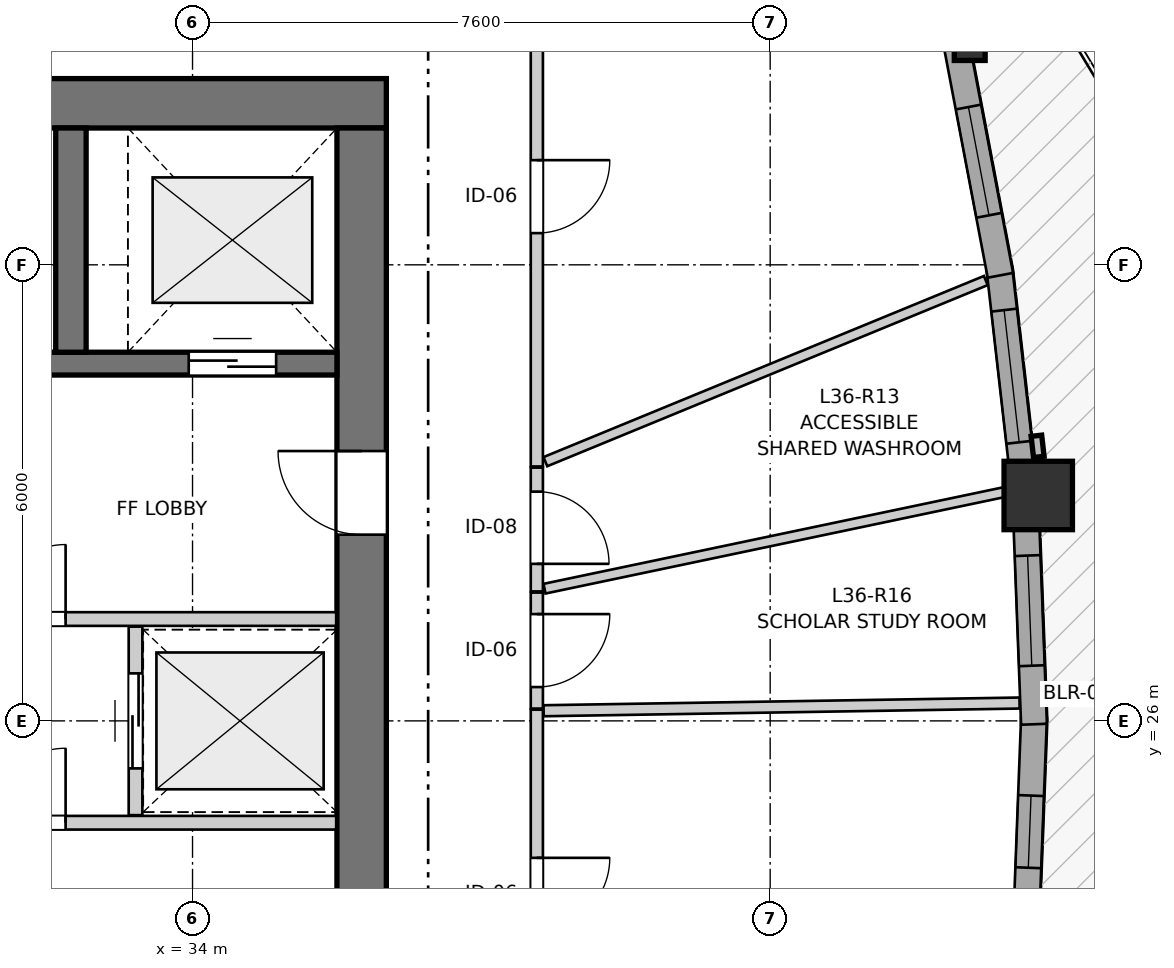
"""IFC4 building model, lengths in metres.
Left out: names, types, materials, properties, quantities, classifications, styles, units other than length and angle.
Written with IfcOpenShell. Run it as: python <this file> out.ifc"""

import sys

from ifc_helpers import new_model, si_unit, direction, frame, frame_2d, origin, origin_2d, place, context, subcontext, project, spatial, rectangle, i_section, extrude, source, transform, mapped, element, fill, save


model = new_model("IFC4")
c1 = context("Model", 3, precision=1e-05, world=origin(), true_north=direction((0.0, 1.0)))
c2 = subcontext(c1, "Body", "Model", "MODEL_VIEW")
j1 = project(units=[si_unit("LENGTHUNIT", "METRE"), si_unit("PLANEANGLEUNIT", "RADIAN")], contexts=[c1])
p1 = place(None, origin())
s1 = spatial("IfcSite", under=j1, at=p1, CompositionType="ELEMENT")
p2 = place(p1, origin())
s2 = spatial("IfcBuilding", under=s1, at=p2, CompositionType="ELEMENT")
p3 = place(p2, frame((0.0, 0.0, 121.6)))
s3 = spatial("IfcBuildingStorey", under=s2, at=p3, CompositionType="ELEMENT", Elevation=121.6)
p4 = place(p3, frame((36.55, 34.125, 0.0), z_axis=(0.0, 0.0, 1.0), x_axis=(-1.0, 0.0, 0.0)))
e1 = element("IfcWall", 1, at=p4, inside=s3, PredefinedType="SHEAR", context=c2, shape_type="SweptSolid", body=[
    extrude(rectangle(XDim=12.4, YDim=0.65, at=frame_2d((6.2, 0.0))), origin(), (0.0, 0.0, 1.0), 2.95),
])
p5 = place(p3, frame((36.225, 18.2, 0.0), z_axis=(0.0, 0.0, 1.0), x_axis=(0.0, 1.0, 0.0)))
e2 = element("IfcWall", 2, at=p5, inside=s3, PredefinedType="SHEAR", context=c2, shape_type="SweptSolid", body=[
    extrude(rectangle(XDim=15.6, YDim=0.65, at=frame_2d((7.8, 0.0))), origin(), (0.0, 0.0, 1.0), 2.95),
])
p6 = place(p5, frame((4.25, 0.0, 0.0)))
e3 = element("IfcOpeningElement", 3, at=p6, cuts=e2, PredefinedType="OPENING", context=c2, shape_type="SweptSolid", body=[
    extrude(rectangle(XDim=1.1, YDim=2.15, at=frame_2d((0.55, 1.075))), frame((0.0, 0.335, 0.0), z_axis=(0.0, -1.0, 0.0), x_axis=(1.0, 0.0, 0.0)), (0.0, 0.0, 1.0), 0.67),
])
p7 = place(p5, frame((10.25, 0.0, 0.0)))
e4 = element("IfcOpeningElement", 4, at=p7, cuts=e2, PredefinedType="OPENING", context=c2, shape_type="SweptSolid", body=[
    extrude(rectangle(XDim=1.1, YDim=2.15, at=frame_2d((0.55, 1.075))), frame((0.0, 0.335, 0.0), z_axis=(0.0, -1.0, 0.0), x_axis=(1.0, 0.0, 0.0)), (0.0, 0.0, 1.0), 0.67),
])
p8 = place(p3, frame((24.8, 30.7, 0.0), z_axis=(0.0, 0.0, 1.0), x_axis=(1.0, 0.0, 0.0)))
e5 = element("IfcWall", 5, at=p8, inside=s3, PredefinedType="SHEAR", context=c2, shape_type="SweptSolid", body=[
    extrude(rectangle(XDim=11.1, YDim=0.3, at=frame_2d((5.55, 0.0))), origin(), (0.0, 0.0, 1.0), 2.95),
])
p9 = place(p8, frame((6.22, 0.0, 0.0)))
e6 = element("IfcOpeningElement", 6, at=p9, cuts=e5, PredefinedType="OPENING", context=c2, shape_type="SweptSolid", body=[
    extrude(rectangle(XDim=0.98, YDim=2.15, at=frame_2d((0.49, 1.075))), frame((0.0, 0.16, 0.0), z_axis=(0.0, -1.0, 0.0), x_axis=(1.0, 0.0, 0.0)), (0.0, 0.0, 1.0), 0.32),
])
p10 = place(p8, frame((9.15, 0.0, 0.0)))
e7 = element("IfcOpeningElement", 7, at=p10, cuts=e5, PredefinedType="OPENING", context=c2, shape_type="SweptSolid", body=[
    extrude(rectangle(XDim=1.15, YDim=2.15, at=frame_2d((0.575, 1.075))), frame((0.0, 0.16, 0.0), z_axis=(0.0, -1.0, 0.0), x_axis=(1.0, 0.0, 0.0)), (0.0, 0.0, 1.0), 0.32),
])
p11 = place(p3, frame((32.4, 30.85, 0.0), z_axis=(0.0, 0.0, 1.0), x_axis=(0.0, 1.0, 0.0)))
e8 = element("IfcWall", 8, at=p11, inside=s3, PredefinedType="SHEAR", context=c2, shape_type="SweptSolid", body=[
    extrude(rectangle(XDim=2.95, YDim=0.4, at=frame_2d((1.475, 0.0))), origin(), (0.0, 0.0, 1.0), 2.95),
])
m1 = source(origin(), c2, "Body", "SweptSolid", [
    extrude(rectangle(XDim=0.9, YDim=0.9, at=origin_2d()), origin(), (0.0, 0.0, 1.0), 2.95),
])
p12 = place(p3, frame((45.127, 28.966, 0.0), z_axis=(0.0, 0.0, 1.0), x_axis=(1.0, 0.0, 0.0)))
e9 = element("IfcColumn", 9, at=p12, inside=s3, PredefinedType="COLUMN", context=c2, shape_type="MappedRepresentation", body=[
    mapped(m1, transform((0.0, 0.0, 0.0), x_axis=(1.0, 0.0, 0.0), y_axis=(0.0, 1.0, 0.0), z_axis=(0.0, 0.0, 1.0), scale=1.0)),
])
m2 = source(origin(), c2, "Body", "SweptSolid", [
    extrude(i_section(OverallWidth=0.406, OverallDepth=0.416, WebThickness=0.027, FlangeThickness=0.044, FilletRadius=0.015, at=origin_2d()), origin(), (0.0, 0.0, 1.0), 2.95),
])
p13 = place(p3, frame((44.226, 34.896, 0.0), z_axis=(0.0, 0.0, 1.0), x_axis=(1.0, 0.0, 0.0)))
e10 = element("IfcColumn", 10, at=p13, inside=s3, PredefinedType="PILASTER", context=c2, shape_type="MappedRepresentation", body=[
    mapped(m2, transform((0.0, 0.0, 0.0), x_axis=(1.0, 0.0, 0.0), y_axis=(0.0, 1.0, 0.0), z_axis=(0.0, 0.0, 1.0), scale=1.0)),
])
p14 = place(p3, frame((44.958, 23.061, 0.0), z_axis=(0.0, 0.0, 1.0), x_axis=(0.037940097137, 0.999280015326, 0.0)))
e11 = element("IfcWall", 11, at=p14, inside=s3, PredefinedType="SOLIDWALL", context=c2, shape_type="SweptSolid", body=[
    extrude(rectangle(XDim=2.986, YDim=0.34, at=frame_2d((1.493, 0.0))), origin(), (0.0, 0.0, 1.0), 2.48),
])
p15 = place(p14, frame((1.008, 0.0, 0.82)))
e12 = element("IfcOpeningElement", 12, at=p15, cuts=e11, PredefinedType="OPENING", context=c2, shape_type="SweptSolid", body=[
    extrude(rectangle(XDim=0.95, YDim=1.35, at=frame_2d((0.475, 0.675))), frame((0.0, 0.18, 0.0), z_axis=(0.0, -1.0, 0.0), x_axis=(1.0, 0.0, 0.0)), (0.0, 0.0, 1.0), 0.36),
])
p16 = place(p3, frame((45.071, 25.956, 0.0), z_axis=(0.0, 0.0, 1.0), x_axis=(-0.037997361734, 0.999277839493, 0.0)))
e13 = element("IfcWall", 13, at=p16, inside=s3, PredefinedType="SOLIDWALL", context=c2, shape_type="SweptSolid", body=[
    extrude(rectangle(XDim=2.776, YDim=0.34, at=frame_2d((1.388, 0.0))), origin(), (0.0, 0.0, 1.0), 2.48),
])
p17 = place(p16, frame((0.771, 0.0, 0.82)))
e14 = element("IfcOpeningElement", 14, at=p17, cuts=e13, PredefinedType="OPENING", context=c2, shape_type="SweptSolid", body=[
    extrude(rectangle(XDim=1.45, YDim=1.25, at=frame_2d((0.725, 0.625))), frame((0.0, 0.18, 0.0), z_axis=(0.0, -1.0, 0.0), x_axis=(1.0, 0.0, 0.0)), (0.0, 0.0, 1.0), 0.36),
])
p18 = place(p3, frame((44.932, 29.175, 0.0), z_axis=(0.0, 0.0, 1.0), x_axis=(-0.113290188042, 0.993561942354, 0.0)))
e15 = element("IfcWall", 15, at=p18, inside=s3, PredefinedType="SOLIDWALL", context=c2, shape_type="SweptSolid", body=[
    extrude(rectangle(XDim=2.793, YDim=0.34, at=frame_2d((1.396, 0.0))), origin(), (0.0, 0.0, 1.0), 2.48),
])
p19 = place(p18, frame((0.493, 0.0, 0.82)))
e16 = element("IfcOpeningElement", 16, at=p19, cuts=e15, PredefinedType="OPENING", context=c2, shape_type="SweptSolid", body=[
    extrude(rectangle(XDim=1.75, YDim=1.3, at=frame_2d((0.875, 0.65))), frame((0.0, 0.18, 0.0), z_axis=(0.0, -1.0, 0.0), x_axis=(1.0, 0.0, 0.0)), (0.0, 0.0, 1.0), 0.36),
])
p20 = place(p3, frame((44.629, 31.862, 0.0), z_axis=(0.0, 0.0, 1.0), x_axis=(-0.186690909565, 0.982418701108, 0.0)))
e17 = element("IfcWall", 17, at=p20, inside=s3, PredefinedType="SOLIDWALL", context=c2, shape_type="SweptSolid", body=[
    extrude(rectangle(XDim=3.037, YDim=0.34, at=frame_2d((1.518, 0.0))), origin(), (0.0, 0.0, 1.0), 2.48),
])
p21 = place(p20, frame((0.803, 0.0, 0.82)))
e18 = element("IfcOpeningElement", 18, at=p21, cuts=e17, PredefinedType="OPENING", context=c2, shape_type="SweptSolid", body=[
    extrude(rectangle(XDim=1.45, YDim=1.25, at=frame_2d((0.725, 0.625))), frame((0.0, 0.18, 0.0), z_axis=(0.0, -1.0, 0.0), x_axis=(1.0, 0.0, 0.0)), (0.0, 0.0, 1.0), 0.36),
])
p22 = place(p3, frame((30.67, 24.66, 0.0), z_axis=(0.0, 0.0, 1.0), x_axis=(1.0, 0.0, 0.0)))
e19 = element("IfcWall", 19, at=p22, inside=s3, PredefinedType="PARTITIONING", context=c2, shape_type="SweptSolid", body=[
    extrude(rectangle(XDim=5.22, YDim=0.18, at=frame_2d((2.61, 0.0))), origin(), (0.0, 0.0, 1.0), 2.95),
])
p23 = place(p22, frame((0.68, 0.0, 0.0)))
e20 = element("IfcOpeningElement", 20, at=p23, cuts=e19, PredefinedType="OPENING", context=c2, shape_type="SweptSolid", body=[
    extrude(rectangle(XDim=0.98, YDim=2.15, at=frame_2d((0.49, 1.075))), frame((0.0, 0.1, 0.0), z_axis=(0.0, -1.0, 0.0), x_axis=(1.0, 0.0, 0.0)), (0.0, 0.0, 1.0), 0.2),
])
p24 = place(p3, frame((30.67, 27.34, 0.0), z_axis=(0.0, 0.0, 1.0), x_axis=(1.0, 0.0, 0.0)))
e21 = element("IfcWall", 21, at=p24, inside=s3, PredefinedType="PARTITIONING", context=c2, shape_type="SweptSolid", body=[
    extrude(rectangle(XDim=5.22, YDim=0.18, at=frame_2d((2.61, 0.0))), origin(), (0.0, 0.0, 1.0), 2.95),
])
p25 = place(p24, frame((0.68, 0.0, 0.0)))
e22 = element("IfcOpeningElement", 22, at=p25, cuts=e21, PredefinedType="OPENING", context=c2, shape_type="SweptSolid", body=[
    extrude(rectangle(XDim=0.98, YDim=2.15, at=frame_2d((0.49, 1.075))), frame((0.0, 0.1, 0.0), z_axis=(0.0, -1.0, 0.0), x_axis=(1.0, 0.0, 0.0)), (0.0, 0.0, 1.0), 0.2),
])
p26 = place(p3, frame((33.25, 24.76, 0.0), z_axis=(0.0, 0.0, 1.0), x_axis=(0.0, 1.0, 0.0)))
e23 = element("IfcWall", 23, at=p26, inside=s3, PredefinedType="PARTITIONING", context=c2, shape_type="SweptSolid", body=[
    extrude(rectangle(XDim=2.48, YDim=0.18, at=frame_2d((1.24, 0.0))), origin(), (0.0, 0.0, 1.0), 2.95),
])
p27 = place(p26, frame((0.615, 0.0, 0.0)))
e24 = element("IfcOpeningElement", 24, at=p27, cuts=e23, PredefinedType="OPENING", context=c2, shape_type="SweptSolid", body=[
    extrude(rectangle(XDim=1.25, YDim=2.15, at=frame_2d((0.625, 1.075))), frame((0.0, 0.1, 0.0), z_axis=(0.0, -1.0, 0.0), x_axis=(1.0, 0.0, 0.0)), (0.0, 0.0, 1.0), 0.2),
])
p28 = place(p3, frame((38.53, 36.43, 0.0), z_axis=(0.0, 0.0, 1.0), x_axis=(0.0, -1.0, 0.0)))
e25 = element("IfcWall", 25, at=p28, inside=s3, PredefinedType="PARTITIONING", context=c2, shape_type="SweptSolid", body=[
    extrude(rectangle(XDim=7.083, YDim=0.16, at=frame_2d((3.542, 0.0))), origin(), (0.0, 0.0, 1.0), 2.588),
])
p29 = place(p28, frame((3.053, 0.0, 0.0)))
e26 = element("IfcOpeningElement", 26, at=p29, cuts=e25, PredefinedType="OPENING", context=c2, shape_type="SweptSolid", body=[
    extrude(rectangle(XDim=0.96, YDim=2.1, at=frame_2d((0.48, 1.05))), frame((0.0, 0.09, 0.0), z_axis=(0.0, -1.0, 0.0), x_axis=(1.0, 0.0, 0.0)), (0.0, 0.0, 1.0), 0.18),
])
p30 = place(p3, frame((38.53, 26.147, 0.0), z_axis=(0.0, 0.0, 1.0), x_axis=(0.0, -1.0, 0.0)))
e27 = element("IfcWall", 27, at=p30, inside=s3, PredefinedType="PARTITIONING", context=c2, shape_type="SweptSolid", body=[
    extrude(rectangle(XDim=4.811, YDim=0.16, at=frame_2d((2.406, 0.0))), origin(), (0.0, 0.0, 1.0), 2.95),
])
p31 = place(p30, frame((1.949, 0.0, 0.0)))
e28 = element("IfcOpeningElement", 28, at=p31, cuts=e27, PredefinedType="OPENING", context=c2, shape_type="SweptSolid", body=[
    extrude(rectangle(XDim=0.96, YDim=2.1, at=frame_2d((0.48, 1.05))), frame((0.0, 0.09, 0.0), z_axis=(0.0, -1.0, 0.0), x_axis=(1.0, 0.0, 0.0)), (0.0, 0.0, 1.0), 0.18),
])
p32 = place(p3, frame((38.53, 29.332, 0.0), z_axis=(0.0, 0.0, 1.0), x_axis=(0.0, -1.0, 0.0)))
e29 = element("IfcWall", 29, at=p32, inside=s3, PredefinedType="PARTITIONING", context=c2, shape_type="SweptSolid", body=[
    extrude(rectangle(XDim=1.629, YDim=0.16, at=frame_2d((0.814, 0.0))), origin(), (0.0, 0.0, 1.0), 2.95),
])
p33 = place(p32, frame((0.316, 0.0, 0.0)))
e30 = element("IfcOpeningElement", 30, at=p33, cuts=e29, PredefinedType="OPENING", context=c2, shape_type="SweptSolid", body=[
    extrude(rectangle(XDim=0.95, YDim=2.1, at=frame_2d((0.475, 1.05))), frame((0.0, 0.09, 0.0), z_axis=(0.0, -1.0, 0.0), x_axis=(1.0, 0.0, 0.0)), (0.0, 0.0, 1.0), 0.18),
])
p34 = place(p3, frame((38.53, 27.688, 0.0), z_axis=(0.0, 0.0, 1.0), x_axis=(0.0, -1.0, 0.0)))
e31 = element("IfcWall", 31, at=p34, inside=s3, PredefinedType="PARTITIONING", context=c2, shape_type="SweptSolid", body=[
    extrude(rectangle(XDim=1.526, YDim=0.16, at=frame_2d((0.763, 0.0))), origin(), (0.0, 0.0, 1.0), 2.95),
])
p35 = place(p34, frame((0.283, 0.0, 0.0)))
e32 = element("IfcOpeningElement", 32, at=p35, cuts=e31, PredefinedType="OPENING", context=c2, shape_type="SweptSolid", body=[
    extrude(rectangle(XDim=0.96, YDim=2.1, at=frame_2d((0.48, 1.05))), frame((0.0, 0.09, 0.0), z_axis=(0.0, -1.0, 0.0), x_axis=(1.0, 0.0, 0.0)), (0.0, 0.0, 1.0), 0.18),
])
p36 = place(p3, frame((38.642, 29.41, 0.0), z_axis=(0.0, 0.0, 1.0), x_axis=(0.924865201518, 0.380295094659, 0.0)))
e33 = element("IfcWall", 33, at=p36, inside=s3, PredefinedType="PARTITIONING", context=c2, shape_type="SweptSolid", body=[
    extrude(rectangle(XDim=6.266, YDim=0.13, at=frame_2d((3.133, 0.0))), origin(), (0.0, 0.0, 1.0), 2.95),
])
p37 = place(p3, frame((38.631, 27.739, 0.0), z_axis=(0.0, 0.0, 1.0), x_axis=(0.978654667538, 0.205511658323, 0.0)))
e34 = element("IfcWall", 34, at=p37, inside=s3, PredefinedType="PARTITIONING", context=c2, shape_type="SweptSolid", body=[
    extrude(rectangle(XDim=6.29, YDim=0.13, at=frame_2d((3.145, 0.0))), origin(), (0.0, 0.0, 1.0), 2.368),
])
p38 = place(p3, frame((38.619, 26.133, 0.0), z_axis=(0.0, 0.0, 1.0), x_axis=(0.999869130012, 0.016177850558, 0.0)))
e35 = element("IfcWall", 35, at=p38, inside=s3, PredefinedType="PARTITIONING", context=c2, shape_type="SweptSolid", body=[
    extrude(rectangle(XDim=6.263, YDim=0.145, at=frame_2d((3.131, 0.0))), origin(), (0.0, 0.0, 1.0), 2.95),
])
m3 = source(origin(), c2, "Body", "SweptSolid", [
    extrude(rectangle(XDim=0.95, YDim=1.35, at=frame_2d((0.475, 0.675))), frame((0.0, 0.03, 0.0), z_axis=(0.0, -1.0, 0.0), x_axis=(1.0, 0.0, 0.0)), (0.0, 0.0, 1.0), 0.06),
])
p39 = place(p15, origin())
e36 = element("IfcWindow", 36, at=p39, inside=s3, PartitioningType="SINGLE_PANEL", PredefinedType="WINDOW", context=c2, shape_type="MappedRepresentation", body=[
    mapped(m3, transform((0.0, 0.0, 0.0), x_axis=(1.0, 0.0, 0.0), y_axis=(0.0, 1.0, 0.0), z_axis=(0.0, 0.0, 1.0), scale=1.0)),
])
fill(e12, e36)
m4 = source(origin(), c2, "Body", "SweptSolid", [
    extrude(rectangle(XDim=1.45, YDim=1.25, at=frame_2d((0.725, 0.625))), frame((0.0, 0.03, 0.0), z_axis=(0.0, -1.0, 0.0), x_axis=(1.0, 0.0, 0.0)), (0.0, 0.0, 1.0), 0.06),
])
p40 = place(p17, origin())
e37 = element("IfcWindow", 37, at=p40, inside=s3, PartitioningType="SINGLE_PANEL", PredefinedType="WINDOW", context=c2, shape_type="MappedRepresentation", body=[
    mapped(m4, transform((0.0, 0.0, 0.0), x_axis=(1.0, 0.0, 0.0), y_axis=(0.0, 1.0, 0.0), z_axis=(0.0, 0.0, 1.0), scale=1.0)),
])
fill(e14, e37)
m5 = source(origin(), c2, "Body", "SweptSolid", [
    extrude(rectangle(XDim=1.75, YDim=1.3, at=frame_2d((0.875, 0.65))), frame((0.0, 0.03, 0.0), z_axis=(0.0, -1.0, 0.0), x_axis=(1.0, 0.0, 0.0)), (0.0, 0.0, 1.0), 0.06),
])
p41 = place(p19, origin())
e38 = element("IfcWindow", 38, at=p41, inside=s3, PartitioningType="SINGLE_PANEL", PredefinedType="WINDOW", context=c2, shape_type="MappedRepresentation", body=[
    mapped(m5, transform((0.0, 0.0, 0.0), x_axis=(1.0, 0.0, 0.0), y_axis=(0.0, 1.0, 0.0), z_axis=(0.0, 0.0, 1.0), scale=1.0)),
])
fill(e16, e38)
p42 = place(p21, origin())
e39 = element("IfcWindow", 39, at=p42, inside=s3, PartitioningType="SINGLE_PANEL", PredefinedType="WINDOW", context=c2, shape_type="MappedRepresentation", body=[
    mapped(m4, transform((0.0, 0.0, 0.0), x_axis=(1.0, 0.0, 0.0), y_axis=(0.0, 1.0, 0.0), z_axis=(0.0, 0.0, 1.0), scale=1.0)),
])
fill(e18, e39)
m6 = source(origin(), c2, "Body", "SweptSolid", [
    extrude(rectangle(XDim=1.15, YDim=2.15, at=frame_2d((0.575, 1.075))), frame((0.0, 0.025, 0.0), z_axis=(0.0, -1.0, 0.0), x_axis=(1.0, 0.0, 0.0)), (0.0, 0.0, 1.0), 0.05),
])
p43 = place(p10, origin())
e40 = element("IfcDoor", 40, at=p43, inside=s3, OperationType="DOUBLE_DOOR_SLIDING", PredefinedType="DOOR", context=c2, shape_type="MappedRepresentation", body=[
    mapped(m6, transform((0.0, 0.0, 0.0), x_axis=(1.0, 0.0, 0.0), y_axis=(0.0, 1.0, 0.0), z_axis=(0.0, 0.0, 1.0), scale=1.0)),
])
fill(e7, e40)
m7 = source(origin(), c2, "Body", "SweptSolid", [
    extrude(rectangle(XDim=1.1, YDim=2.15, at=frame_2d((0.55, 1.075))), frame((0.0, 0.025, 0.0), z_axis=(0.0, -1.0, 0.0), x_axis=(1.0, 0.0, 0.0)), (0.0, 0.0, 1.0), 0.05),
])
p44 = place(p7, origin())
e41 = element("IfcDoor", 41, at=p44, inside=s3, OperationType="SINGLE_SWING_RIGHT", PredefinedType="DOOR", context=c2, shape_type="MappedRepresentation", body=[
    mapped(m7, transform((0.0, 0.0, 0.0), x_axis=(1.0, 0.0, 0.0), y_axis=(0.0, 1.0, 0.0), z_axis=(0.0, 0.0, 1.0), scale=1.0)),
])
fill(e4, e41)
m8 = source(origin(), c2, "Body", "SweptSolid", [
    extrude(rectangle(XDim=0.98, YDim=2.15, at=frame_2d((0.49, 1.075))), frame((0.0, 0.025, 0.0), z_axis=(0.0, -1.0, 0.0), x_axis=(1.0, 0.0, 0.0)), (0.0, 0.0, 1.0), 0.05),
])
p45 = place(p23, origin())
e42 = element("IfcDoor", 42, at=p45, inside=s3, OperationType="SINGLE_SWING_RIGHT", PredefinedType="DOOR", context=c2, shape_type="MappedRepresentation", body=[
    mapped(m8, transform((0.0, 0.0, 0.0), x_axis=(1.0, 0.0, 0.0), y_axis=(0.0, 1.0, 0.0), z_axis=(0.0, 0.0, 1.0), scale=1.0)),
])
fill(e20, e42)
p46 = place(p25, origin())
e43 = element("IfcDoor", 43, at=p46, inside=s3, OperationType="SINGLE_SWING_RIGHT", PredefinedType="DOOR", context=c2, shape_type="MappedRepresentation", body=[
    mapped(m8, transform((0.0, 0.0, 0.0), x_axis=(1.0, 0.0, 0.0), y_axis=(0.0, 1.0, 0.0), z_axis=(0.0, 0.0, 1.0), scale=1.0)),
])
fill(e22, e43)
m9 = source(origin(), c2, "Body", "SweptSolid", [
    extrude(rectangle(XDim=1.25, YDim=2.15, at=frame_2d((0.625, 1.075))), frame((0.0, 0.025, 0.0), z_axis=(0.0, -1.0, 0.0), x_axis=(1.0, 0.0, 0.0)), (0.0, 0.0, 1.0), 0.05),
])
p47 = place(p27, origin())
e44 = element("IfcDoor", 44, at=p47, inside=s3, OperationType="DOUBLE_DOOR_SLIDING", PredefinedType="DOOR", context=c2, shape_type="MappedRepresentation", body=[
    mapped(m9, transform((0.0, 0.0, 0.0), x_axis=(1.0, 0.0, 0.0), y_axis=(0.0, 1.0, 0.0), z_axis=(0.0, 0.0, 1.0), scale=1.0)),
])
fill(e24, e44)
m10 = source(origin(), c2, "Body", "SweptSolid", [
    extrude(rectangle(XDim=0.96, YDim=2.1, at=frame_2d((0.48, 1.05))), frame((0.0, 0.025, 0.0), z_axis=(0.0, -1.0, 0.0), x_axis=(1.0, 0.0, 0.0)), (0.0, 0.0, 1.0), 0.05),
])
p48 = place(p29, origin())
e45 = element("IfcDoor", 45, at=p48, inside=s3, OperationType="SINGLE_SWING_LEFT", PredefinedType="DOOR", context=c2, shape_type="MappedRepresentation", body=[
    mapped(m10, transform((0.0, 0.0, 0.0), x_axis=(1.0, 0.0, 0.0), y_axis=(0.0, 1.0, 0.0), z_axis=(0.0, 0.0, 1.0), scale=1.0)),
])
fill(e26, e45)
p49 = place(p31, origin())
e46 = element("IfcDoor", 46, at=p49, inside=s3, OperationType="SINGLE_SWING_LEFT", PredefinedType="DOOR", context=c2, shape_type="MappedRepresentation", body=[
    mapped(m10, transform((0.0, 0.0, 0.0), x_axis=(1.0, 0.0, 0.0), y_axis=(0.0, 1.0, 0.0), z_axis=(0.0, 0.0, 1.0), scale=1.0)),
])
fill(e28, e46)
m11 = source(origin(), c2, "Body", "SweptSolid", [
    extrude(rectangle(XDim=0.95, YDim=2.1, at=frame_2d((0.475, 1.05))), frame((0.0, 0.025, 0.0), z_axis=(0.0, -1.0, 0.0), x_axis=(1.0, 0.0, 0.0)), (0.0, 0.0, 1.0), 0.05),
])
p50 = place(p33, origin())
e47 = element("IfcDoor", 47, at=p50, inside=s3, OperationType="SINGLE_SWING_RIGHT", PredefinedType="DOOR", context=c2, shape_type="MappedRepresentation", body=[
    mapped(m11, transform((0.0, 0.0, 0.0), x_axis=(1.0, 0.0, 0.0), y_axis=(0.0, 1.0, 0.0), z_axis=(0.0, 0.0, 1.0), scale=1.0)),
])
fill(e30, e47)
p51 = place(p35, origin())
e48 = element("IfcDoor", 48, at=p51, inside=s3, OperationType="SINGLE_SWING_LEFT", PredefinedType="DOOR", context=c2, shape_type="MappedRepresentation", body=[
    mapped(m10, transform((0.0, 0.0, 0.0), x_axis=(1.0, 0.0, 0.0), y_axis=(0.0, 1.0, 0.0), z_axis=(0.0, 0.0, 1.0), scale=1.0)),
])
fill(e32, e48)
save(model, sys.argv[1])
